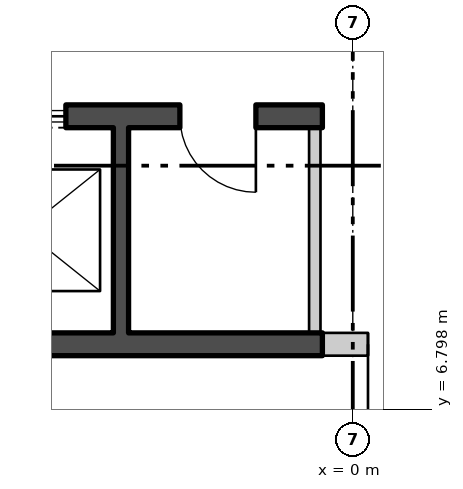
"""IFC4 building model, lengths in metres.
Left out: names, types, materials, properties, quantities, classifications, styles, units other than length and angle.
Written with IfcOpenShell. Run it as: python <this file> out.ifc"""

import sys

from ifc_helpers import new_model, si_unit, direction, frame, frame_2d, origin, place, context, subcontext, project, spatial, polyline, rectangle, outline, extrude, element, fill, save


model = new_model("IFC4")
c1 = context("Model", 3, precision=1e-05, world=origin(), true_north=direction((0.0, 1.0)))
c2 = subcontext(c1, "Body", "Model", "MODEL_VIEW")
j1 = project(units=[si_unit("LENGTHUNIT", "METRE"), si_unit("PLANEANGLEUNIT", "RADIAN")], contexts=[c1])
p1 = place(None, origin())
s1 = spatial("IfcSite", under=j1, at=p1, CompositionType="ELEMENT")
p2 = place(p1, origin())
s2 = spatial("IfcBuilding", under=s1, at=p2, CompositionType="ELEMENT")
p3 = place(p2, frame((0.0, 0.0, 329.4)))
s3 = spatial("IfcBuildingStorey", under=s2, at=p3, CompositionType="ELEMENT", Elevation=329.4)
p4 = place(p3, frame((-24.765, 16.684, -0.18), z_axis=(0.0, 0.0, 1.0), x_axis=(0.500000141277, -0.866025322218, 0.0)))
e1 = element("IfcWall", 1, at=p4, inside=s3, PredefinedType="SOLIDWALL", context=c2, shape_type="SweptSolid", body=[
    extrude(outline(polyline([(-0.13, -0.225), (45.86, -0.225), (45.6, 0.225), (0.13, 0.225), (-0.13, -0.225)])), origin(), (0.0, 0.0, 1.0), 3.98),
])
p5 = place(p4, frame((1.424, 0.0, 1.08)))
e2 = element("IfcOpeningElement", 2, at=p5, cuts=e1, PredefinedType="OPENING", context=c2, shape_type="SweptSolid", body=[
    extrude(rectangle(XDim=2.4, YDim=2.3, at=frame_2d((1.2, 1.15))), frame((0.0, 0.235, 0.0), z_axis=(0.0, -1.0, 0.0), x_axis=(1.0, 0.0, 0.0)), (0.0, 0.0, 1.0), 0.47),
])
p6 = place(p4, frame((5.892, 0.0, 1.08)))
e3 = element("IfcOpeningElement", 3, at=p6, cuts=e1, PredefinedType="OPENING", context=c2, shape_type="SweptSolid", body=[
    extrude(rectangle(XDim=2.4, YDim=2.3, at=frame_2d((1.2, 1.15))), frame((0.0, 0.235, 0.0), z_axis=(0.0, -1.0, 0.0), x_axis=(1.0, 0.0, 0.0)), (0.0, 0.0, 1.0), 0.47),
])
p7 = place(p4, frame((10.399, 0.0, 1.08)))
e4 = element("IfcOpeningElement", 4, at=p7, cuts=e1, PredefinedType="OPENING", context=c2, shape_type="SweptSolid", body=[
    extrude(rectangle(XDim=2.4, YDim=2.3, at=frame_2d((1.2, 1.15))), frame((0.0, 0.235, 0.0), z_axis=(0.0, -1.0, 0.0), x_axis=(1.0, 0.0, 0.0)), (0.0, 0.0, 1.0), 0.47),
])
p8 = place(p4, frame((19.412, 0.0, 1.08)))
e5 = element("IfcOpeningElement", 5, at=p8, cuts=e1, PredefinedType="OPENING", context=c2, shape_type="SweptSolid", body=[
    extrude(rectangle(XDim=2.4, YDim=2.3, at=frame_2d((1.2, 1.15))), frame((0.0, 0.235, 0.0), z_axis=(0.0, -1.0, 0.0), x_axis=(1.0, 0.0, 0.0)), (0.0, 0.0, 1.0), 0.47),
])
p9 = place(p4, frame((23.918, 0.0, 1.08)))
e6 = element("IfcOpeningElement", 6, at=p9, cuts=e1, PredefinedType="OPENING", context=c2, shape_type="SweptSolid", body=[
    extrude(rectangle(XDim=2.4, YDim=2.3, at=frame_2d((1.2, 1.15))), frame((0.0, 0.235, 0.0), z_axis=(0.0, -1.0, 0.0), x_axis=(1.0, 0.0, 0.0)), (0.0, 0.0, 1.0), 0.47),
])
p10 = place(p4, frame((28.425, 0.0, 1.08)))
e7 = element("IfcOpeningElement", 7, at=p10, cuts=e1, PredefinedType="OPENING", context=c2, shape_type="SweptSolid", body=[
    extrude(rectangle(XDim=2.4, YDim=2.3, at=frame_2d((1.2, 1.15))), frame((0.0, 0.235, 0.0), z_axis=(0.0, -1.0, 0.0), x_axis=(1.0, 0.0, 0.0)), (0.0, 0.0, 1.0), 0.47),
])
p11 = place(p4, frame((37.438, 0.0, 1.08)))
e8 = element("IfcOpeningElement", 8, at=p11, cuts=e1, PredefinedType="OPENING", context=c2, shape_type="SweptSolid", body=[
    extrude(rectangle(XDim=2.4, YDim=2.3, at=frame_2d((1.2, 1.15))), frame((0.0, 0.235, 0.0), z_axis=(0.0, -1.0, 0.0), x_axis=(1.0, 0.0, 0.0)), (0.0, 0.0, 1.0), 0.47),
])
p12 = place(p4, frame((41.907, 0.0, 1.08)))
e9 = element("IfcOpeningElement", 9, at=p12, cuts=e1, PredefinedType="OPENING", context=c2, shape_type="SweptSolid", body=[
    extrude(rectangle(XDim=2.4, YDim=2.3, at=frame_2d((1.2, 1.15))), frame((0.0, 0.235, 0.0), z_axis=(0.0, -1.0, 0.0), x_axis=(1.0, 0.0, 0.0)), (0.0, 0.0, 1.0), 0.47),
])
p13 = place(p3, frame((-10.7, 10.65, 0.0), z_axis=(0.0, 0.0, 1.0), x_axis=(1.0, 0.0, 0.0)))
e10 = element("IfcWall", 10, at=p13, inside=s3, PredefinedType="SHEAR", context=c2, shape_type="SweptSolid", body=[
    extrude(rectangle(XDim=10.3, YDim=0.3, at=frame_2d((5.15, 0.0))), origin(), (0.0, 0.0, 1.0), 4.0),
])
p14 = place(p13, frame((0.675, 0.0, 0.0)))
e11 = element("IfcOpeningElement", 11, at=p14, cuts=e10, PredefinedType="OPENING", context=c2, shape_type="SweptSolid", body=[
    extrude(rectangle(XDim=1.1, YDim=2.1, at=frame_2d((0.55, 1.05))), frame((0.0, 0.16, 0.0), z_axis=(0.0, -1.0, 0.0), x_axis=(1.0, 0.0, 0.0)), (0.0, 0.0, 1.0), 0.32),
])
p15 = place(p13, frame((3.275, 0.0, 0.0)))
e12 = element("IfcOpeningElement", 12, at=p15, cuts=e10, PredefinedType="OPENING", context=c2, shape_type="SweptSolid", body=[
    extrude(rectangle(XDim=1.1, YDim=2.1, at=frame_2d((0.55, 1.05))), frame((0.0, 0.16, 0.0), z_axis=(0.0, -1.0, 0.0), x_axis=(1.0, 0.0, 0.0)), (0.0, 0.0, 1.0), 0.32),
])
p16 = place(p13, frame((5.825, 0.0, 0.0)))
e13 = element("IfcOpeningElement", 13, at=p16, cuts=e10, PredefinedType="OPENING", context=c2, shape_type="SweptSolid", body=[
    extrude(rectangle(XDim=1.1, YDim=2.1, at=frame_2d((0.55, 1.05))), frame((0.0, 0.16, 0.0), z_axis=(0.0, -1.0, 0.0), x_axis=(1.0, 0.0, 0.0)), (0.0, 0.0, 1.0), 0.32),
])
p17 = place(p13, frame((8.425, 0.0, 0.0)))
e14 = element("IfcOpeningElement", 14, at=p17, cuts=e10, PredefinedType="OPENING", context=c2, shape_type="SweptSolid", body=[
    extrude(rectangle(XDim=1.0, YDim=2.1, at=frame_2d((0.5, 1.05))), frame((0.0, 0.16, 0.0), z_axis=(0.0, -1.0, 0.0), x_axis=(1.0, 0.0, 0.0)), (0.0, 0.0, 1.0), 0.32),
])
p18 = place(p3, frame((-10.7, 7.65, 0.0), z_axis=(0.0, 0.0, 1.0), x_axis=(1.0, 0.0, 0.0)))
e15 = element("IfcWall", 15, at=p18, inside=s3, PredefinedType="SHEAR", context=c2, shape_type="SweptSolid", body=[
    extrude(rectangle(XDim=10.3, YDim=0.3, at=frame_2d((5.15, 0.0))), origin(), (0.0, 0.0, 1.0), 4.0),
])
p19 = place(p3, frame((-3.05, 7.8, 0.0), z_axis=(0.0, 0.0, 1.0), x_axis=(0.0, 1.0, 0.0)))
e16 = element("IfcWall", 16, at=p19, inside=s3, PredefinedType="SHEAR", context=c2, shape_type="SweptSolid", body=[
    extrude(rectangle(XDim=2.7, YDim=0.2, at=frame_2d((1.35, 0.0))), origin(), (0.0, 0.0, 1.0), 4.0),
])
p20 = place(p3, frame((-0.5, 7.8, 0.0), z_axis=(0.0, 0.0, 1.0), x_axis=(0.0, 1.0, 0.0)))
e17 = element("IfcWall", 17, at=p20, inside=s3, PredefinedType="PARTITIONING", context=c2, shape_type="SweptSolid", body=[
    extrude(rectangle(XDim=2.7, YDim=0.15, at=frame_2d((1.35, 0.0))), origin(), (0.0, 0.0, 1.0), 4.0),
])
p21 = place(p3, frame((-0.4, 7.65, 0.0), z_axis=(0.0, 0.0, 1.0), x_axis=(1.0, 0.0, 0.0)))
e18 = element("IfcWall", 18, at=p21, inside=s3, PredefinedType="PARTITIONING", context=c2, shape_type="SweptSolid", body=[
    extrude(rectangle(XDim=3.0, YDim=0.3, at=frame_2d((1.5, 0.0))), origin(), (0.0, 0.0, 1.0), 4.0),
])
p22 = place(p21, frame((0.6, 0.0, 0.0)))
e19 = element("IfcOpeningElement", 19, at=p22, cuts=e18, PredefinedType="OPENING", context=c2, shape_type="SweptSolid", body=[
    extrude(rectangle(XDim=1.8, YDim=2.4, at=frame_2d((0.9, 1.2))), frame((0.0, 0.16, 0.0), z_axis=(0.0, -1.0, 0.0), x_axis=(1.0, 0.0, 0.0)), (0.0, 0.0, 1.0), 0.32),
])
p23 = place(p16, origin())
e20 = element("IfcDoor", 20, at=p23, inside=s3, OperationType="SLIDING_TO_LEFT", PredefinedType="DOOR", context=c2, shape_type="SweptSolid", body=[
    extrude(rectangle(XDim=1.1, YDim=2.1, at=frame_2d((0.55, 1.05))), frame((0.0, 0.025, 0.0), z_axis=(0.0, -1.0, 0.0), x_axis=(1.0, 0.0, 0.0)), (0.0, 0.0, 1.0), 0.05),
])
fill(e13, e20)
p24 = place(p17, origin())
e21 = element("IfcDoor", 21, at=p24, inside=s3, OperationType="SINGLE_SWING_RIGHT", PredefinedType="DOOR", context=c2, shape_type="SweptSolid", body=[
    extrude(rectangle(XDim=1.0, YDim=2.1, at=frame_2d((0.5, 1.05))), frame((0.0, 0.025, 0.0), z_axis=(0.0, -1.0, 0.0), x_axis=(1.0, 0.0, 0.0)), (0.0, 0.0, 1.0), 0.05),
])
fill(e14, e21)
p25 = place(p22, origin())
e22 = element("IfcDoor", 22, at=p25, inside=s3, OperationType="DOUBLE_DOOR_SINGLE_SWING", PredefinedType="DOOR", context=c2, shape_type="SweptSolid", body=[
    extrude(rectangle(XDim=1.8, YDim=2.4, at=frame_2d((0.9, 1.2))), frame((0.0, 0.025, 0.0), z_axis=(0.0, -1.0, 0.0), x_axis=(1.0, 0.0, 0.0)), (0.0, 0.0, 1.0), 0.05),
])
fill(e19, e22)
save(model, sys.argv[1])
